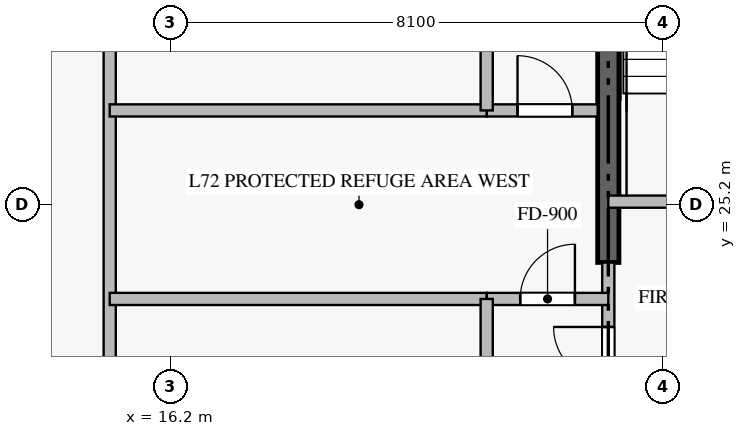
"""IFC4 building model, lengths in metres.
Left out: names, types, materials, properties, quantities, classifications, styles, units other than length and angle.
Written with IfcOpenShell. Run it as: python <this file> out.ifc"""

import sys

from ifc_helpers import new_model, si_unit, direction, frame, frame_2d, origin, place, context, subcontext, project, spatial, rectangle, extrude, source, transform, mapped, element, fill, save


model = new_model("IFC4")
c1 = context("Model", 3, precision=1e-05, world=origin(), true_north=direction((0.0, 1.0)))
c2 = subcontext(c1, "Body", "Model", "MODEL_VIEW")
j1 = project(units=[si_unit("LENGTHUNIT", "METRE"), si_unit("PLANEANGLEUNIT", "RADIAN")], contexts=[c1])
p1 = place(None, origin())
s1 = spatial("IfcSite", under=j1, at=p1, CompositionType="ELEMENT")
p2 = place(p1, origin())
s2 = spatial("IfcBuilding", under=s1, at=p2, CompositionType="ELEMENT")
p3 = place(p2, frame((0.0, 0.0, 287.45)))
s3 = spatial("IfcBuildingStorey", under=s2, at=p3, CompositionType="ELEMENT", Elevation=287.45)
p4 = place(p3, frame((23.4, 24.25, -0.44), z_axis=(0.0, 0.0, 1.0), x_axis=(0.0, 1.0, 0.0)))
e1 = element("IfcWall", 1, at=p4, inside=s3, PredefinedType="SHEAR", context=c2, shape_type="SweptSolid", body=[
    extrude(rectangle(XDim=9.175, YDim=0.35, at=frame_2d((4.587, 0.0))), origin(), (0.0, 0.0, 1.0), 6.178),
])
p5 = place(p3, frame((23.4, 25.25, 0.0), z_axis=(0.0, 0.0, 1.0), x_axis=(1.0, 0.0, 0.0)))
e2 = element("IfcWall", 2, at=p5, inside=s3, PredefinedType="STANDARD", context=c2, shape_type="SweptSolid", body=[
    extrude(rectangle(XDim=4.45, YDim=0.2, at=frame_2d((2.225, 0.0))), origin(), (0.0, 0.0, 1.0), 5.74),
])
p6 = place(p5, frame((1.65, 0.0, 0.0)))
e3 = element("IfcOpeningElement", 3, at=p6, cuts=e2, PredefinedType="OPENING", context=c2, shape_type="SweptSolid", body=[
    extrude(rectangle(XDim=1.1, YDim=2.15, at=frame_2d((0.55, 1.075))), frame((0.0, 0.11, 0.0), z_axis=(0.0, -1.0, 0.0), x_axis=(1.0, 0.0, 0.0)), (0.0, 0.0, 1.0), 0.22),
])
p7 = place(p3, frame((23.4, 21.852, 0.0), z_axis=(0.0, 0.0, 1.0), x_axis=(0.0, 1.0, 0.0)))
e4 = element("IfcWall", 4, at=p7, inside=s3, PredefinedType="STANDARD", context=c2, shape_type="SweptSolid", body=[
    extrude(rectangle(XDim=2.396, YDim=0.2, at=frame_2d((1.198, 0.0))), origin(), (0.0, 0.0, 1.0), 5.74),
])
p8 = place(p7, frame((0.437, 0.0, 0.0)))
e5 = element("IfcOpeningElement", 5, at=p8, cuts=e4, PredefinedType="OPENING", context=c2, shape_type="SweptSolid", body=[
    extrude(rectangle(XDim=0.9, YDim=2.1, at=frame_2d((0.45, 1.05))), frame((0.0, 0.11, 0.0), z_axis=(0.0, -1.0, 0.0), x_axis=(1.0, 0.0, 0.0)), (0.0, 0.0, 1.0), 0.22),
])
p9 = place(p3, frame((15.2, 9.0, 0.0), z_axis=(0.0, 0.0, 1.0), x_axis=(0.0, 1.0, 0.0)))
e6 = element("IfcWall", 6, at=p9, inside=s3, PredefinedType="STANDARD", context=c2, shape_type="SweptSolid", body=[
    extrude(rectangle(XDim=32.4, YDim=0.2, at=frame_2d((16.2, 0.0))), origin(), (0.0, 0.0, 1.0), 5.74),
])
p10 = place(p3, frame((15.2, 23.65, 0.0), z_axis=(0.0, 0.0, 1.0), x_axis=(1.0, 0.0, 0.0)))
e7 = element("IfcWall", 7, at=p10, inside=s3, PredefinedType="STANDARD", context=c2, shape_type="SweptSolid", body=[
    extrude(rectangle(XDim=6.2, YDim=0.2, at=frame_2d((3.1, 0.0))), origin(), (0.0, 0.0, 1.0), 5.74),
])
p11 = place(p3, frame((21.402, 23.65, 0.0), z_axis=(0.0, 0.0, 1.0), x_axis=(1.0, 0.0, 0.0)))
e8 = element("IfcWall", 8, at=p11, inside=s3, PredefinedType="STANDARD", context=c2, shape_type="SweptSolid", body=[
    extrude(rectangle(XDim=1.998, YDim=0.2, at=frame_2d((0.999, 0.0))), origin(), (0.0, 0.0, 1.0), 5.74),
])
p12 = place(p11, frame((0.549, 0.0, 0.0)))
e9 = element("IfcOpeningElement", 9, at=p12, cuts=e8, PredefinedType="OPENING", context=c2, shape_type="SweptSolid", body=[
    extrude(rectangle(XDim=0.9, YDim=2.1, at=frame_2d((0.45, 1.05))), frame((0.0, 0.11, 0.0), z_axis=(0.0, -1.0, 0.0), x_axis=(1.0, 0.0, 0.0)), (0.0, 0.0, 1.0), 0.22),
])
p13 = place(p3, frame((15.2, 26.75, 0.0), z_axis=(0.0, 0.0, 1.0), x_axis=(1.0, 0.0, 0.0)))
e10 = element("IfcWall", 10, at=p13, inside=s3, PredefinedType="STANDARD", context=c2, shape_type="SweptSolid", body=[
    extrude(rectangle(XDim=6.2, YDim=0.2, at=frame_2d((3.1, 0.0))), origin(), (0.0, 0.0, 1.0), 5.74),
])
p14 = place(p3, frame((21.402, 26.75, 0.0), z_axis=(0.0, 0.0, 1.0), x_axis=(1.0, 0.0, 0.0)))
e11 = element("IfcWall", 11, at=p14, inside=s3, PredefinedType="STANDARD", context=c2, shape_type="SweptSolid", body=[
    extrude(rectangle(XDim=1.823, YDim=0.2, at=frame_2d((0.912, 0.0))), origin(), (0.0, 0.0, 1.0), 5.74),
])
p15 = place(p14, frame((0.505, 0.0, 0.0)))
e12 = element("IfcOpeningElement", 12, at=p15, cuts=e11, PredefinedType="OPENING", context=c2, shape_type="SweptSolid", body=[
    extrude(rectangle(XDim=0.9, YDim=2.1, at=frame_2d((0.45, 1.05))), frame((0.0, 0.11, 0.0), z_axis=(0.0, -1.0, 0.0), x_axis=(1.0, 0.0, 0.0)), (0.0, 0.0, 1.0), 0.22),
])
p16 = place(p3, frame((21.4, 14.8, 0.0), z_axis=(0.0, 0.0, 1.0), x_axis=(0.0, 1.0, 0.0)))
e13 = element("IfcWall", 13, at=p16, inside=s3, PredefinedType="STANDARD", context=c2, shape_type="SweptSolid", body=[
    extrude(rectangle(XDim=8.85, YDim=0.2, at=frame_2d((4.425, 0.0))), origin(), (0.0, 0.0, 1.0), 5.74),
])
p17 = place(p16, frame((1.788, 0.0, 0.0)))
e14 = element("IfcOpeningElement", 14, at=p17, cuts=e13, PredefinedType="OPENING", context=c2, shape_type="SweptSolid", body=[
    extrude(rectangle(XDim=1.4, YDim=2.2, at=frame_2d((0.7, 1.1))), frame((0.0, 0.11, 0.0), z_axis=(0.0, -1.0, 0.0), x_axis=(1.0, 0.0, 0.0)), (0.0, 0.0, 1.0), 0.22),
])
p18 = place(p3, frame((21.4, 26.75, 0.0), z_axis=(0.0, 0.0, 1.0), x_axis=(0.0, 1.0, 0.0)))
e15 = element("IfcWall", 15, at=p18, inside=s3, PredefinedType="STANDARD", context=c2, shape_type="SweptSolid", body=[
    extrude(rectangle(XDim=8.85, YDim=0.2, at=frame_2d((4.425, 0.0))), origin(), (0.0, 0.0, 1.0), 5.74),
])
p19 = place(p18, frame((5.662, 0.0, 0.0)))
e16 = element("IfcOpeningElement", 16, at=p19, cuts=e15, PredefinedType="OPENING", context=c2, shape_type="SweptSolid", body=[
    extrude(rectangle(XDim=1.4, YDim=2.2, at=frame_2d((0.7, 1.1))), frame((0.0, 0.11, 0.0), z_axis=(0.0, -1.0, 0.0), x_axis=(1.0, 0.0, 0.0)), (0.0, 0.0, 1.0), 0.22),
])
m1 = source(origin(), c2, "Body", "SweptSolid", [
    extrude(rectangle(XDim=0.9, YDim=2.1, at=frame_2d((0.45, 1.05))), frame((0.0, 0.025, 0.0), z_axis=(0.0, -1.0, 0.0), x_axis=(1.0, 0.0, 0.0)), (0.0, 0.0, 1.0), 0.05),
])
p20 = place(p8, origin())
e17 = element("IfcDoor", 17, at=p20, inside=s3, OperationType="SINGLE_SWING_RIGHT", PredefinedType="DOOR", context=c2, shape_type="MappedRepresentation", body=[
    mapped(m1, transform((0.0, 0.0, 0.0), scale=1.0)),
])
fill(e5, e17)
p21 = place(p12, origin())
e18 = element("IfcDoor", 18, at=p21, inside=s3, OperationType="SINGLE_SWING_RIGHT", PredefinedType="DOOR", context=c2, shape_type="MappedRepresentation", body=[
    mapped(m1, transform((0.0, 0.0, 0.0), scale=1.0)),
])
fill(e9, e18)
p22 = place(p15, origin())
e19 = element("IfcDoor", 19, at=p22, inside=s3, OperationType="SINGLE_SWING_LEFT", PredefinedType="DOOR", context=c2, shape_type="MappedRepresentation", body=[
    mapped(m1, transform((0.0, 0.0, 0.0), scale=1.0)),
])
fill(e12, e19)
save(model, sys.argv[1])
